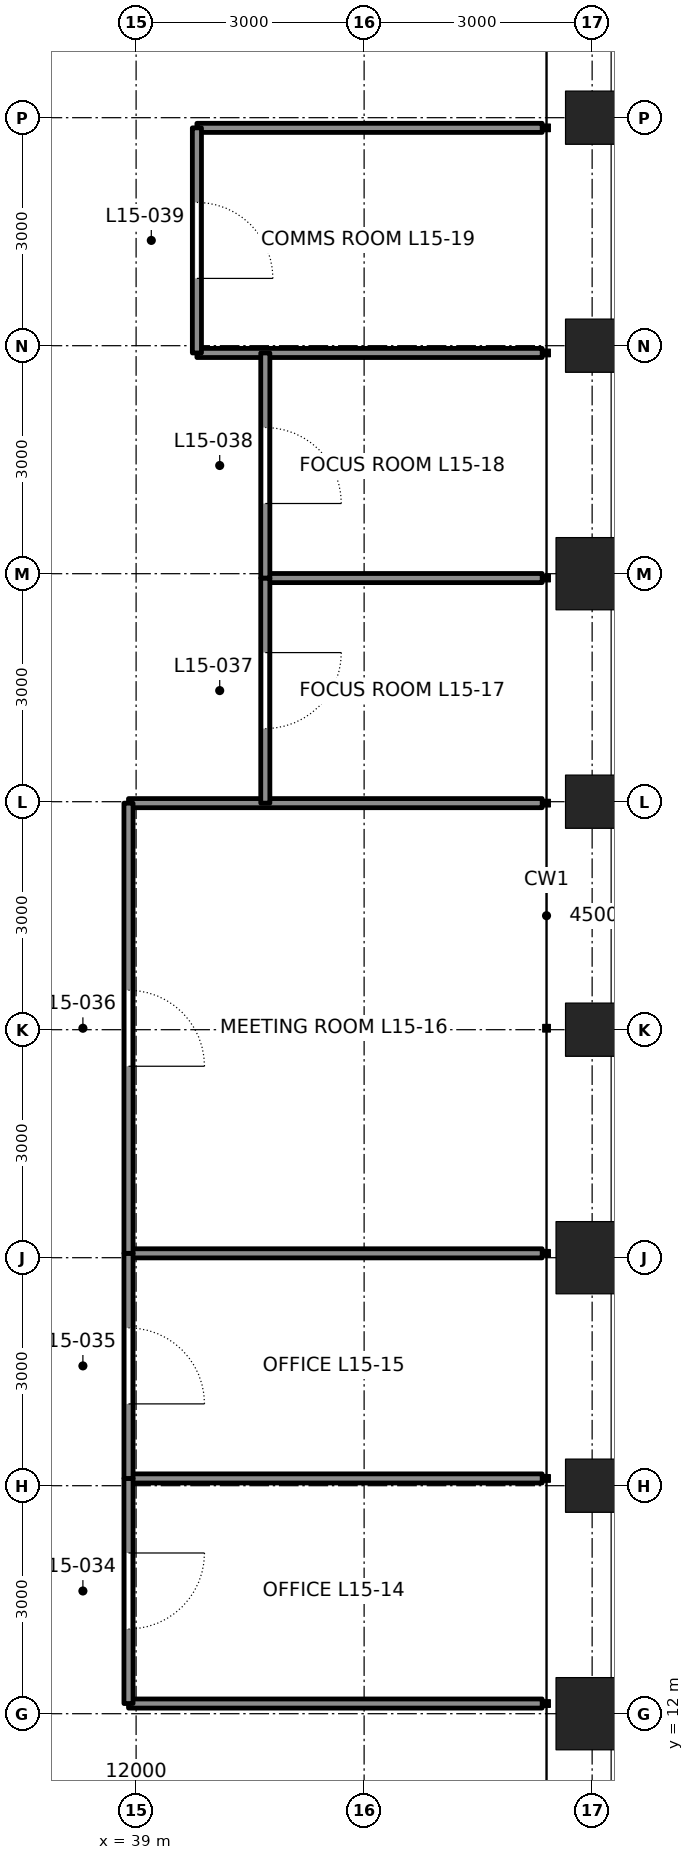
"""IFC4 building model, lengths in metres.
Left out: names, types, materials, properties, quantities, classifications, styles, units other than length and angle.
Written with IfcOpenShell. Run it as: python <this file> out.ifc"""

import sys

from ifc_helpers import new_model, si_unit, direction, frame, frame_2d, origin, origin_2d, place, context, subcontext, project, spatial, rectangle, hollow_rectangle, extrude, element, fill, save


model = new_model("IFC4")
c1 = context("Model", 3, precision=1e-05, world=origin(), true_north=direction((0.0, 1.0)))
c2 = subcontext(c1, "Body", "Model", "MODEL_VIEW")
j1 = project(units=[si_unit("LENGTHUNIT", "METRE"), si_unit("PLANEANGLEUNIT", "RADIAN")], contexts=[c1])
p1 = place(None, origin())
s1 = spatial("IfcSite", under=j1, at=p1, CompositionType="ELEMENT")
p2 = place(p1, origin())
s2 = spatial("IfcBuilding", under=s1, at=p2, CompositionType="ELEMENT")
p3 = place(p2, frame((0.0, 0.0, 73.8)))
s3 = spatial("IfcBuildingStorey", under=s2, at=p3, CompositionType="ELEMENT", Elevation=73.8)
p4 = place(p3, frame((45.0, 12.0, 0.0), z_axis=(0.0, 0.0, 1.0), x_axis=(1.0, 0.0, 0.0)))
e1 = element("IfcColumn", 1, at=p4, inside=s3, PredefinedType="COLUMN", context=c2, shape_type="SweptSolid", body=[
    extrude(hollow_rectangle(XDim=0.95, YDim=0.95, WallThickness=0.11, at=origin_2d()), origin(), (0.0, 0.0, 1.0), 4.5),
])
p5 = place(p3, frame((45.0, 15.0, 0.0), z_axis=(0.0, 0.0, 1.0), x_axis=(1.0, 0.0, 0.0)))
e2 = element("IfcColumn", 2, at=p5, inside=s3, PredefinedType="COLUMN", context=c2, shape_type="SweptSolid", body=[
    extrude(hollow_rectangle(XDim=0.7, YDim=0.7, WallThickness=0.07, at=origin_2d()), origin(), (0.0, 0.0, 1.0), 4.5),
])
p6 = place(p3, frame((45.0, 18.0, 0.0), z_axis=(0.0, 0.0, 1.0), x_axis=(1.0, 0.0, 0.0)))
e3 = element("IfcColumn", 3, at=p6, inside=s3, PredefinedType="COLUMN", context=c2, shape_type="SweptSolid", body=[
    extrude(hollow_rectangle(XDim=0.95, YDim=0.95, WallThickness=0.11, at=origin_2d()), origin(), (0.0, 0.0, 1.0), 4.5),
])
for number, where, z_axis, x_axis in (
    (4, (45.0, 21.0, 0.0), (0.0, 0.0, 1.0), (1.0, 0.0, 0.0)),
    (5, (45.0, 24.0, 0.0), (0.0, 0.0, 1.0), (1.0, 0.0, 0.0)),
):
    element("IfcColumn", number, at=place(p3, frame(where, z_axis=z_axis, x_axis=x_axis)), inside=s3, PredefinedType="COLUMN", context=c2, shape_type="SweptSolid", body=[
        extrude(hollow_rectangle(XDim=0.7, YDim=0.7, WallThickness=0.07, at=origin_2d()), origin(), (0.0, 0.0, 1.0), 4.5),
    ])
p7 = place(p3, frame((45.0, 27.0, 0.0), z_axis=(0.0, 0.0, 1.0), x_axis=(1.0, 0.0, 0.0)))
e6 = element("IfcColumn", 6, at=p7, inside=s3, PredefinedType="COLUMN", context=c2, shape_type="SweptSolid", body=[
    extrude(hollow_rectangle(XDim=0.95, YDim=0.95, WallThickness=0.11, at=origin_2d()), origin(), (0.0, 0.0, 1.0), 4.5),
])
for number, where, z_axis, x_axis in (
    (7, (45.0, 30.0, 0.0), (0.0, 0.0, 1.0), (1.0, 0.0, 0.0)),
    (8, (45.0, 33.0, 0.0), (0.0, 0.0, 1.0), (1.0, 0.0, 0.0)),
):
    element("IfcColumn", number, at=place(p3, frame(where, z_axis=z_axis, x_axis=x_axis)), inside=s3, PredefinedType="COLUMN", context=c2, shape_type="SweptSolid", body=[
        extrude(hollow_rectangle(XDim=0.7, YDim=0.7, WallThickness=0.07, at=origin_2d()), origin(), (0.0, 0.0, 1.0), 4.5),
    ])
p8 = place(p3, frame((44.343, 12.134, -0.3), z_axis=(0.0, 0.0, 1.0), x_axis=(-1.0, 0.0, 0.0)))
e9 = element("IfcWall", 9, at=p8, inside=s3, PredefinedType="PARTITIONING", context=c2, shape_type="SweptSolid", body=[
    extrude(rectangle(XDim=5.443, YDim=0.12, at=frame_2d((2.721, 0.0))), origin(), (0.0, 0.0, 1.0), 3.481),
])
for number, where, z_axis, x_axis in (
    (10, (44.343, 15.096, -0.3), (0.0, 0.0, 1.0), (-1.0, 0.0, 0.0)),
    (11, (44.343, 18.057, -0.3), (0.0, 0.0, 1.0), (-1.0, 0.0, 0.0)),
    (12, (44.343, 23.981, -0.3), (0.0, 0.0, 1.0), (-1.0, 0.0, 0.0)),
):
    element("IfcWall", number, at=place(p3, frame(where, z_axis=z_axis, x_axis=x_axis)), inside=s3, PredefinedType="PARTITIONING", context=c2, shape_type="SweptSolid", body=[
        extrude(rectangle(XDim=5.443, YDim=0.12, at=frame_2d((2.721, 0.0))), origin(), (0.0, 0.0, 1.0), 3.646),
    ])
p9 = place(p3, frame((44.343, 26.943, -0.3), z_axis=(0.0, 0.0, 1.0), x_axis=(-1.0, 0.0, 0.0)))
e13 = element("IfcWall", 13, at=p9, inside=s3, PredefinedType="PARTITIONING", context=c2, shape_type="SweptSolid", body=[
    extrude(rectangle(XDim=3.643, YDim=0.12, at=frame_2d((1.821, 0.0))), origin(), (0.0, 0.0, 1.0), 3.646),
])
p10 = place(p3, frame((44.343, 29.904, -0.3), z_axis=(0.0, 0.0, 1.0), x_axis=(-1.0, 0.0, 0.0)))
e14 = element("IfcWall", 14, at=p10, inside=s3, PredefinedType="PARTITIONING", context=c2, shape_type="SweptSolid", body=[
    extrude(rectangle(XDim=4.542, YDim=0.12, at=frame_2d((2.271, 0.0))), origin(), (0.0, 0.0, 1.0), 3.646),
])
p11 = place(p3, frame((44.343, 32.866, -0.3), z_axis=(0.0, 0.0, 1.0), x_axis=(-1.0, 0.0, 0.0)))
e15 = element("IfcWall", 15, at=p11, inside=s3, PredefinedType="PARTITIONING", context=c2, shape_type="SweptSolid", body=[
    extrude(rectangle(XDim=4.542, YDim=0.12, at=frame_2d((2.271, 0.0))), origin(), (0.0, 0.0, 1.0), 3.481),
])
p12 = place(p3, frame((38.9, 12.134, -0.3), z_axis=(0.0, 0.0, 1.0), x_axis=(0.0, 1.0, 0.0)))
e16 = element("IfcWall", 16, at=p12, inside=s3, PredefinedType="PARTITIONING", context=c2, shape_type="SweptSolid", body=[
    extrude(rectangle(XDim=2.962, YDim=0.12, at=frame_2d((1.481, 0.0))), origin(), (0.0, 0.0, 1.0), 4.34),
])
p13 = place(p12, frame((0.981, 0.0, 0.3)))
e17 = element("IfcOpeningElement", 17, at=p13, cuts=e16, PredefinedType="OPENING", context=c2, shape_type="SweptSolid", body=[
    extrude(rectangle(XDim=1.0, YDim=2.4, at=frame_2d((0.5, 1.2))), frame((0.0, 0.07, 0.0), z_axis=(0.0, -1.0, 0.0), x_axis=(1.0, 0.0, 0.0)), (0.0, 0.0, 1.0), 0.14),
])
p14 = place(p3, frame((38.9, 15.096, -0.3), z_axis=(0.0, 0.0, 1.0), x_axis=(0.0, 1.0, 0.0)))
e18 = element("IfcWall", 18, at=p14, inside=s3, PredefinedType="PARTITIONING", context=c2, shape_type="SweptSolid", body=[
    extrude(rectangle(XDim=2.962, YDim=0.12, at=frame_2d((1.481, 0.0))), origin(), (0.0, 0.0, 1.0), 4.34),
])
p15 = place(p14, frame((0.981, 0.0, 0.3)))
e19 = element("IfcOpeningElement", 19, at=p15, cuts=e18, PredefinedType="OPENING", context=c2, shape_type="SweptSolid", body=[
    extrude(rectangle(XDim=1.0, YDim=2.4, at=frame_2d((0.5, 1.2))), frame((0.0, 0.07, 0.0), z_axis=(0.0, -1.0, 0.0), x_axis=(1.0, 0.0, 0.0)), (0.0, 0.0, 1.0), 0.14),
])
p16 = place(p3, frame((38.9, 18.057, -0.3), z_axis=(0.0, 0.0, 1.0), x_axis=(0.0, 1.0, 0.0)))
e20 = element("IfcWall", 20, at=p16, inside=s3, PredefinedType="PARTITIONING", context=c2, shape_type="SweptSolid", body=[
    extrude(rectangle(XDim=5.924, YDim=0.12, at=frame_2d((2.962, 0.0))), origin(), (0.0, 0.0, 1.0), 4.34),
])
p17 = place(p16, frame((2.462, 0.0, 0.3)))
e21 = element("IfcOpeningElement", 21, at=p17, cuts=e20, PredefinedType="OPENING", context=c2, shape_type="SweptSolid", body=[
    extrude(rectangle(XDim=1.0, YDim=2.4, at=frame_2d((0.5, 1.2))), frame((0.0, 0.07, 0.0), z_axis=(0.0, -1.0, 0.0), x_axis=(1.0, 0.0, 0.0)), (0.0, 0.0, 1.0), 0.14),
])
p18 = place(p3, frame((40.7, 23.981, -0.3), z_axis=(0.0, 0.0, 1.0), x_axis=(0.0, 1.0, 0.0)))
e22 = element("IfcWall", 22, at=p18, inside=s3, PredefinedType="PARTITIONING", context=c2, shape_type="SweptSolid", body=[
    extrude(rectangle(XDim=2.962, YDim=0.12, at=frame_2d((1.481, 0.0))), origin(), (0.0, 0.0, 1.0), 4.34),
])
p19 = place(p18, frame((0.981, 0.0, 0.3)))
e23 = element("IfcOpeningElement", 23, at=p19, cuts=e22, PredefinedType="OPENING", context=c2, shape_type="SweptSolid", body=[
    extrude(rectangle(XDim=1.0, YDim=2.4, at=frame_2d((0.5, 1.2))), frame((0.0, 0.07, 0.0), z_axis=(0.0, -1.0, 0.0), x_axis=(1.0, 0.0, 0.0)), (0.0, 0.0, 1.0), 0.14),
])
p20 = place(p3, frame((40.7, 26.943, -0.3), z_axis=(0.0, 0.0, 1.0), x_axis=(0.0, 1.0, 0.0)))
e24 = element("IfcWall", 24, at=p20, inside=s3, PredefinedType="PARTITIONING", context=c2, shape_type="SweptSolid", body=[
    extrude(rectangle(XDim=2.962, YDim=0.12, at=frame_2d((1.481, 0.0))), origin(), (0.0, 0.0, 1.0), 4.34),
])
p21 = place(p20, frame((0.981, 0.0, 0.3)))
e25 = element("IfcOpeningElement", 25, at=p21, cuts=e24, PredefinedType="OPENING", context=c2, shape_type="SweptSolid", body=[
    extrude(rectangle(XDim=1.0, YDim=2.4, at=frame_2d((0.5, 1.2))), frame((0.0, 0.07, 0.0), z_axis=(0.0, -1.0, 0.0), x_axis=(1.0, 0.0, 0.0)), (0.0, 0.0, 1.0), 0.14),
])
p22 = place(p3, frame((39.8, 29.904, -0.3), z_axis=(0.0, 0.0, 1.0), x_axis=(0.0, 1.0, 0.0)))
e26 = element("IfcWall", 26, at=p22, inside=s3, PredefinedType="PARTITIONING", context=c2, shape_type="SweptSolid", body=[
    extrude(rectangle(XDim=2.962, YDim=0.12, at=frame_2d((1.481, 0.0))), origin(), (0.0, 0.0, 1.0), 4.34),
])
p23 = place(p22, frame((0.981, 0.0, 0.3)))
e27 = element("IfcOpeningElement", 27, at=p23, cuts=e26, PredefinedType="OPENING", context=c2, shape_type="SweptSolid", body=[
    extrude(rectangle(XDim=1.0, YDim=2.4, at=frame_2d((0.5, 1.2))), frame((0.0, 0.07, 0.0), z_axis=(0.0, -1.0, 0.0), x_axis=(1.0, 0.0, 0.0)), (0.0, 0.0, 1.0), 0.14),
])
p24 = place(p13, frame((1.0, 0.0, 0.0), z_axis=(0.0, 0.0, 1.0), x_axis=(-1.0, 0.0, 0.0)))
e28 = element("IfcDoor", 28, at=p24, inside=s3, OperationType="SINGLE_SWING_LEFT", PredefinedType="DOOR", context=c2, shape_type="SweptSolid", body=[
    extrude(rectangle(XDim=1.0, YDim=2.4, at=frame_2d((0.5, 1.2))), frame((0.0, 0.025, 0.0), z_axis=(0.0, -1.0, 0.0), x_axis=(1.0, 0.0, 0.0)), (0.0, 0.0, 1.0), 0.05),
])
fill(e17, e28)
p25 = place(p15, frame((1.0, 0.0, 0.0), z_axis=(0.0, 0.0, 1.0), x_axis=(-1.0, 0.0, 0.0)))
e29 = element("IfcDoor", 29, at=p25, inside=s3, OperationType="SINGLE_SWING_RIGHT", PredefinedType="DOOR", context=c2, shape_type="SweptSolid", body=[
    extrude(rectangle(XDim=1.0, YDim=2.4, at=frame_2d((0.5, 1.2))), frame((0.0, 0.025, 0.0), z_axis=(0.0, -1.0, 0.0), x_axis=(1.0, 0.0, 0.0)), (0.0, 0.0, 1.0), 0.05),
])
fill(e19, e29)
p26 = place(p17, frame((1.0, 0.0, 0.0), z_axis=(0.0, 0.0, 1.0), x_axis=(-1.0, 0.0, 0.0)))
e30 = element("IfcDoor", 30, at=p26, inside=s3, OperationType="SINGLE_SWING_RIGHT", PredefinedType="DOOR", context=c2, shape_type="SweptSolid", body=[
    extrude(rectangle(XDim=1.0, YDim=2.4, at=frame_2d((0.5, 1.2))), frame((0.0, 0.025, 0.0), z_axis=(0.0, -1.0, 0.0), x_axis=(1.0, 0.0, 0.0)), (0.0, 0.0, 1.0), 0.05),
])
fill(e21, e30)
p27 = place(p19, frame((1.0, 0.0, 0.0), z_axis=(0.0, 0.0, 1.0), x_axis=(-1.0, 0.0, 0.0)))
e31 = element("IfcDoor", 31, at=p27, inside=s3, OperationType="SINGLE_SWING_LEFT", PredefinedType="DOOR", context=c2, shape_type="SweptSolid", body=[
    extrude(rectangle(XDim=1.0, YDim=2.4, at=frame_2d((0.5, 1.2))), frame((0.0, 0.025, 0.0), z_axis=(0.0, -1.0, 0.0), x_axis=(1.0, 0.0, 0.0)), (0.0, 0.0, 1.0), 0.05),
])
fill(e23, e31)
p28 = place(p21, frame((1.0, 0.0, 0.0), z_axis=(0.0, 0.0, 1.0), x_axis=(-1.0, 0.0, 0.0)))
e32 = element("IfcDoor", 32, at=p28, inside=s3, OperationType="SINGLE_SWING_RIGHT", PredefinedType="DOOR", context=c2, shape_type="SweptSolid", body=[
    extrude(rectangle(XDim=1.0, YDim=2.4, at=frame_2d((0.5, 1.2))), frame((0.0, 0.025, 0.0), z_axis=(0.0, -1.0, 0.0), x_axis=(1.0, 0.0, 0.0)), (0.0, 0.0, 1.0), 0.05),
])
fill(e25, e32)
p29 = place(p23, frame((1.0, 0.0, 0.0), z_axis=(0.0, 0.0, 1.0), x_axis=(-1.0, 0.0, 0.0)))
e33 = element("IfcDoor", 33, at=p29, inside=s3, OperationType="SINGLE_SWING_RIGHT", PredefinedType="DOOR", context=c2, shape_type="SweptSolid", body=[
    extrude(rectangle(XDim=1.0, YDim=2.4, at=frame_2d((0.5, 1.2))), frame((0.0, 0.025, 0.0), z_axis=(0.0, -1.0, 0.0), x_axis=(1.0, 0.0, 0.0)), (0.0, 0.0, 1.0), 0.05),
])
fill(e27, e33)
save(model, sys.argv[1])
